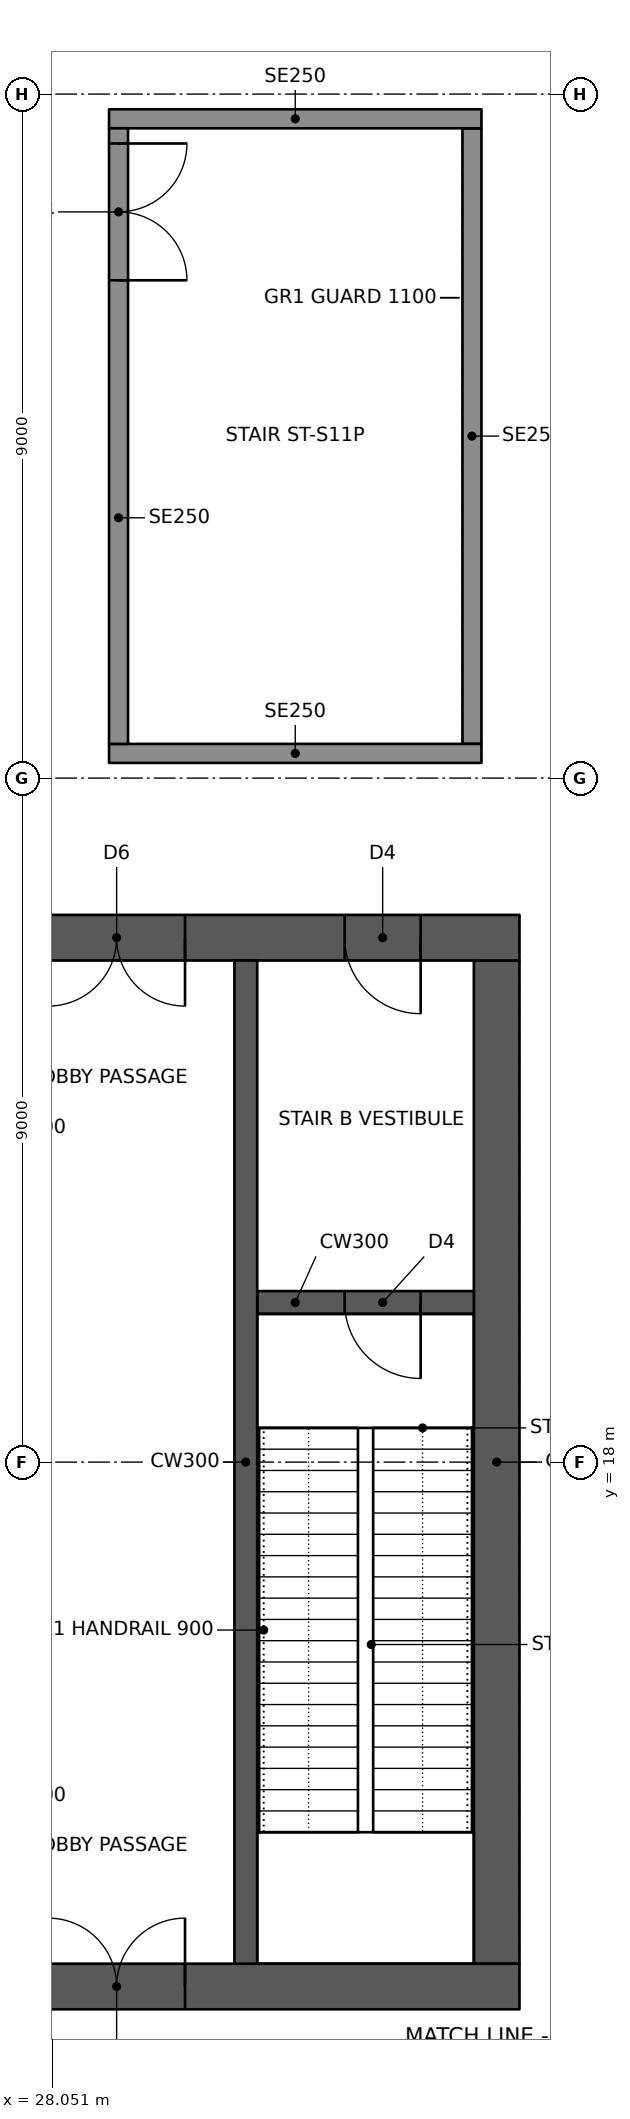
"""IFC4 building model, lengths in metres.
Left out: names, types, materials, properties, quantities, classifications, styles, units other than length and angle.
Written with IfcOpenShell. Run it as: python <this file> out.ifc"""

import sys

from ifc_helpers import new_model, si_unit, direction, frame, frame_2d, origin, place, context, subcontext, project, spatial, rectangle, extrude, element, fill, save


model = new_model("IFC4")
c1 = context("Model", 3, precision=1e-05, world=origin(), true_north=direction((0.0, 1.0)))
c2 = subcontext(c1, "Body", "Model", "MODEL_VIEW")
j1 = project(units=[si_unit("LENGTHUNIT", "METRE"), si_unit("PLANEANGLEUNIT", "RADIAN")], contexts=[c1])
p1 = place(None, origin())
s1 = spatial("IfcSite", under=j1, at=p1, CompositionType="ELEMENT")
p2 = place(p1, origin())
s2 = spatial("IfcBuilding", under=s1, at=p2, CompositionType="ELEMENT")
p3 = place(p2, frame((0.0, 0.0, 16.0)))
s3 = spatial("IfcBuildingStorey", under=s2, at=p3, CompositionType="ELEMENT", Elevation=16.0)
p4 = place(p3, frame((10.8, 11.1, 0.0), z_axis=(0.0, 0.0, 1.0), x_axis=(1.0, 0.0, 0.0)))
e1 = element("IfcWall", 1, at=p4, inside=s3, PredefinedType="SHEAR", context=c2, shape_type="SweptSolid", body=[
    extrude(rectangle(XDim=23.4, YDim=0.6, at=frame_2d((11.7, 0.0))), origin(), (0.0, 0.0, 1.0), 7.0),
])
p5 = place(p4, frame((1.0, 0.0, 0.0)))
e2 = element("IfcOpeningElement", 2, at=p5, cuts=e1, PredefinedType="OPENING", context=c2, shape_type="SweptSolid", body=[
    extrude(rectangle(XDim=1.0, YDim=2.1, at=frame_2d((0.5, 1.05))), frame((0.0, 0.31, 0.0), z_axis=(0.0, -1.0, 0.0), x_axis=(1.0, 0.0, 0.0)), (0.0, 0.0, 1.0), 0.62),
])
p6 = place(p4, frame((17.2, 0.0, 0.0)))
e3 = element("IfcOpeningElement", 3, at=p6, cuts=e1, PredefinedType="OPENING", context=c2, shape_type="SweptSolid", body=[
    extrude(rectangle(XDim=1.8, YDim=2.1, at=frame_2d((0.9, 1.05))), frame((0.0, 0.31, 0.0), z_axis=(0.0, -1.0, 0.0), x_axis=(1.0, 0.0, 0.0)), (0.0, 0.0, 1.0), 0.62),
])
p7 = place(p3, frame((10.8, 24.9, 0.0), z_axis=(0.0, 0.0, 1.0), x_axis=(1.0, 0.0, 0.0)))
e4 = element("IfcWall", 4, at=p7, inside=s3, PredefinedType="SHEAR", context=c2, shape_type="SweptSolid", body=[
    extrude(rectangle(XDim=23.4, YDim=0.6, at=frame_2d((11.7, 0.0))), origin(), (0.0, 0.0, 1.0), 7.0),
])
p8 = place(p7, frame((17.2, 0.0, 0.0)))
e5 = element("IfcOpeningElement", 5, at=p8, cuts=e4, PredefinedType="OPENING", context=c2, shape_type="SweptSolid", body=[
    extrude(rectangle(XDim=1.8, YDim=2.1, at=frame_2d((0.9, 1.05))), frame((0.0, 0.31, 0.0), z_axis=(0.0, -1.0, 0.0), x_axis=(1.0, 0.0, 0.0)), (0.0, 0.0, 1.0), 0.62),
])
p9 = place(p7, frame((21.1, 0.0, 0.0)))
e6 = element("IfcOpeningElement", 6, at=p9, cuts=e4, PredefinedType="OPENING", context=c2, shape_type="SweptSolid", body=[
    extrude(rectangle(XDim=1.0, YDim=2.1, at=frame_2d((0.5, 1.05))), frame((0.0, 0.31, 0.0), z_axis=(0.0, -1.0, 0.0), x_axis=(1.0, 0.0, 0.0)), (0.0, 0.0, 1.0), 0.62),
])
p10 = place(p3, frame((33.9, 11.4, 0.0), z_axis=(0.0, 0.0, 1.0), x_axis=(0.0, 1.0, 0.0)))
e7 = element("IfcWall", 7, at=p10, inside=s3, PredefinedType="SHEAR", context=c2, shape_type="SweptSolid", body=[
    extrude(rectangle(XDim=13.2, YDim=0.6, at=frame_2d((6.6, 0.0))), origin(), (0.0, 0.0, 1.0), 7.0),
])
p11 = place(p3, frame((30.6, 11.4, 0.0), z_axis=(0.0, 0.0, 1.0), x_axis=(0.0, 1.0, 0.0)))
e8 = element("IfcWall", 8, at=p11, inside=s3, PredefinedType="SHEAR", context=c2, shape_type="SweptSolid", body=[
    extrude(rectangle(XDim=13.2, YDim=0.3, at=frame_2d((6.6, 0.0))), origin(), (0.0, 0.0, 1.0), 7.0),
])
p12 = place(p3, frame((30.75, 20.1, 0.0), z_axis=(0.0, 0.0, 1.0), x_axis=(1.0, 0.0, 0.0)))
e9 = element("IfcWall", 9, at=p12, inside=s3, PredefinedType="SHEAR", context=c2, shape_type="SweptSolid", body=[
    extrude(rectangle(XDim=2.85, YDim=0.3, at=frame_2d((1.425, 0.0))), origin(), (0.0, 0.0, 1.0), 7.0),
])
p13 = place(p12, frame((1.15, 0.0, 0.0)))
e10 = element("IfcOpeningElement", 10, at=p13, cuts=e9, PredefinedType="OPENING", context=c2, shape_type="SweptSolid", body=[
    extrude(rectangle(XDim=1.0, YDim=2.1, at=frame_2d((0.5, 1.05))), frame((0.0, 0.16, 0.0), z_axis=(0.0, -1.0, 0.0), x_axis=(1.0, 0.0, 0.0)), (0.0, 0.0, 1.0), 0.32),
])
for number, where, z_axis, x_axis in (
    (11, (28.8, 27.325, 0.0), (0.0, 0.0, 1.0), (1.0, 0.0, 0.0)),
    (12, (28.8, 35.675, 0.0), (0.0, 0.0, 1.0), (1.0, 0.0, 0.0)),
):
    element("IfcWall", number, at=place(p3, frame(where, z_axis=z_axis, x_axis=x_axis)), inside=s3, PredefinedType="SOLIDWALL", context=c2, shape_type="SweptSolid", body=[
        extrude(rectangle(XDim=4.9, YDim=0.25, at=frame_2d((2.45, 0.0))), origin(), (0.0, 0.0, 1.0), 6.7),
    ])
p14 = place(p3, frame((28.925, 27.45, 0.0), z_axis=(0.0, 0.0, 1.0), x_axis=(0.0, 1.0, 0.0)))
e13 = element("IfcWall", 13, at=p14, inside=s3, PredefinedType="SOLIDWALL", context=c2, shape_type="SweptSolid", body=[
    extrude(rectangle(XDim=8.1, YDim=0.25, at=frame_2d((4.05, 0.0))), origin(), (0.0, 0.0, 1.0), 6.7),
])
p15 = place(p14, frame((6.1, 0.0, 0.0)))
e14 = element("IfcOpeningElement", 14, at=p15, cuts=e13, PredefinedType="OPENING", context=c2, shape_type="SweptSolid", body=[
    extrude(rectangle(XDim=1.8, YDim=2.1, at=frame_2d((0.9, 1.05))), frame((0.0, 0.135, 0.0), z_axis=(0.0, -1.0, 0.0), x_axis=(1.0, 0.0, 0.0)), (0.0, 0.0, 1.0), 0.27),
])
p16 = place(p3, frame((33.575, 27.45, 0.0), z_axis=(0.0, 0.0, 1.0), x_axis=(0.0, 1.0, 0.0)))
e15 = element("IfcWall", 15, at=p16, inside=s3, PredefinedType="SOLIDWALL", context=c2, shape_type="SweptSolid", body=[
    extrude(rectangle(XDim=8.1, YDim=0.25, at=frame_2d((4.05, 0.0))), origin(), (0.0, 0.0, 1.0), 6.7),
])
p17 = place(p6, origin())
e16 = element("IfcDoor", 16, at=p17, inside=s3, OperationType="DOUBLE_DOOR_SINGLE_SWING", PredefinedType="DOOR", context=c2, shape_type="SweptSolid", body=[
    extrude(rectangle(XDim=1.8, YDim=2.1, at=frame_2d((0.9, 1.05))), frame((0.0, 0.025, 0.0), z_axis=(0.0, -1.0, 0.0), x_axis=(1.0, 0.0, 0.0)), (0.0, 0.0, 1.0), 0.05),
])
fill(e3, e16)
p18 = place(p8, frame((1.8, 0.0, 0.0), z_axis=(0.0, 0.0, 1.0), x_axis=(-1.0, 0.0, 0.0)))
e17 = element("IfcDoor", 17, at=p18, inside=s3, OperationType="DOUBLE_DOOR_SINGLE_SWING", PredefinedType="DOOR", context=c2, shape_type="SweptSolid", body=[
    extrude(rectangle(XDim=1.8, YDim=2.1, at=frame_2d((0.9, 1.05))), frame((0.0, 0.025, 0.0), z_axis=(0.0, -1.0, 0.0), x_axis=(1.0, 0.0, 0.0)), (0.0, 0.0, 1.0), 0.05),
])
fill(e5, e17)
p19 = place(p9, frame((1.0, 0.0, 0.0), z_axis=(0.0, 0.0, 1.0), x_axis=(-1.0, 0.0, 0.0)))
e18 = element("IfcDoor", 18, at=p19, inside=s3, OperationType="SINGLE_SWING_LEFT", PredefinedType="DOOR", context=c2, shape_type="SweptSolid", body=[
    extrude(rectangle(XDim=1.0, YDim=2.1, at=frame_2d((0.5, 1.05))), frame((0.0, 0.025, 0.0), z_axis=(0.0, -1.0, 0.0), x_axis=(1.0, 0.0, 0.0)), (0.0, 0.0, 1.0), 0.05),
])
fill(e6, e18)
p20 = place(p13, frame((1.0, 0.0, 0.0), z_axis=(0.0, 0.0, 1.0), x_axis=(-1.0, 0.0, 0.0)))
e19 = element("IfcDoor", 19, at=p20, inside=s3, OperationType="SINGLE_SWING_LEFT", PredefinedType="DOOR", context=c2, shape_type="SweptSolid", body=[
    extrude(rectangle(XDim=1.0, YDim=2.1, at=frame_2d((0.5, 1.05))), frame((0.0, 0.025, 0.0), z_axis=(0.0, -1.0, 0.0), x_axis=(1.0, 0.0, 0.0)), (0.0, 0.0, 1.0), 0.05),
])
fill(e10, e19)
p21 = place(p15, frame((1.8, 0.0, 0.0), z_axis=(0.0, 0.0, 1.0), x_axis=(-1.0, 0.0, 0.0)))
e20 = element("IfcDoor", 20, at=p21, inside=s3, OperationType="DOUBLE_DOOR_SINGLE_SWING", PredefinedType="DOOR", context=c2, shape_type="SweptSolid", body=[
    extrude(rectangle(XDim=1.8, YDim=2.1, at=frame_2d((0.9, 1.05))), frame((0.0, 0.025, 0.0), z_axis=(0.0, -1.0, 0.0), x_axis=(1.0, 0.0, 0.0)), (0.0, 0.0, 1.0), 0.05),
])
fill(e14, e20)
save(model, sys.argv[1])
